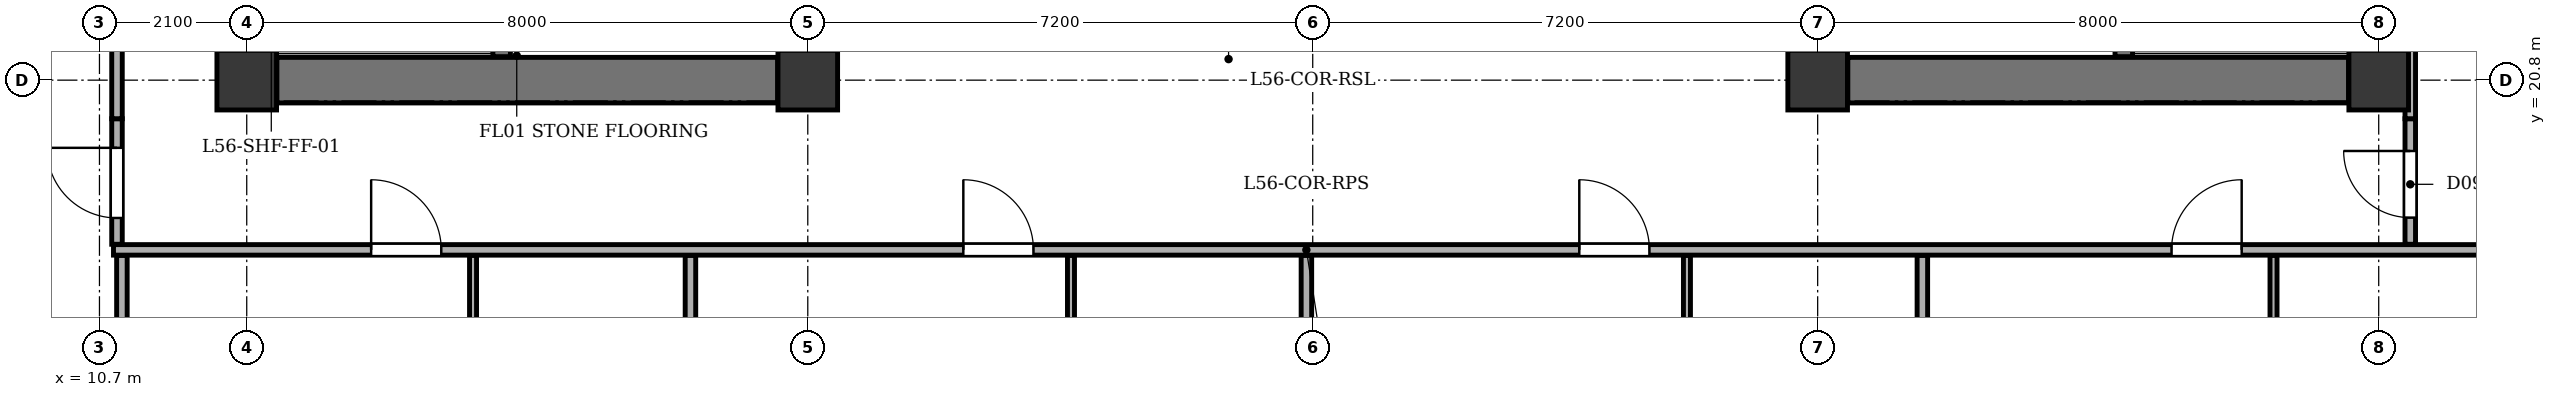
"""IFC4 building model, lengths in metres.
Left out: names, types, materials, properties, quantities, classifications, styles, units other than length and angle.
Written with IfcOpenShell. Run it as: python <this file> out.ifc"""

import sys

from ifc_helpers import new_model, si_unit, direction, frame, frame_2d, origin, origin_2d, place, context, subcontext, project, spatial, rectangle, extrude, element, fill, save


model = new_model("IFC4")
c1 = context("Model", 3, precision=1e-05, world=origin(), true_north=direction((0.0, 1.0)))
c2 = subcontext(c1, "Body", "Model", "MODEL_VIEW")
j1 = project(units=[si_unit("LENGTHUNIT", "METRE"), si_unit("PLANEANGLEUNIT", "RADIAN")], contexts=[c1])
p1 = place(None, origin())
s1 = spatial("IfcSite", under=j1, at=p1, CompositionType="ELEMENT")
p2 = place(p1, origin())
s2 = spatial("IfcBuilding", under=s1, at=p2, CompositionType="ELEMENT")
p3 = place(p2, frame((0.0, 0.0, 217.7)))
s3 = spatial("IfcBuildingStorey", under=s2, at=p3, CompositionType="ELEMENT", Elevation=217.7)
for number, where, z_axis, x_axis in (
    (1, (12.8, 20.8, 0.0), (0.0, 0.0, 1.0), (1.0, 0.0, 0.0)),
    (2, (20.8, 20.8, 0.0), (0.0, 0.0, 1.0), (1.0, 0.0, 0.0)),
    (3, (35.2, 20.8, 0.0), (0.0, 0.0, 1.0), (1.0, 0.0, 0.0)),
    (4, (43.2, 20.8, 0.0), (0.0, 0.0, 1.0), (1.0, 0.0, 0.0)),
):
    element("IfcColumn", number, at=place(p3, frame(where, z_axis=z_axis, x_axis=x_axis)), inside=s3, PredefinedType="COLUMN", context=c2, shape_type="SweptSolid", body=[
        extrude(rectangle(XDim=0.85, YDim=0.85, at=origin_2d()), origin(), (0.0, 0.0, 1.0), 3.4),
    ])
p4 = place(p3, frame((13.23, 20.8, 0.0), z_axis=(0.0, 0.0, 1.0), x_axis=(1.0, 0.0, 0.0)))
e5 = element("IfcWall", 5, at=p4, inside=s3, PredefinedType="SHEAR", context=c2, shape_type="SweptSolid", body=[
    extrude(rectangle(XDim=7.14, YDim=0.65, at=frame_2d((3.57, 0.0))), origin(), (0.0, 0.0, 1.0), 3.1),
])
p5 = place(p3, frame((16.435, 21.135, 0.0), z_axis=(0.0, 0.0, 1.0), x_axis=(0.0, 1.0, 0.0)))
e6 = element("IfcWall", 6, at=p5, inside=s3, PredefinedType="SHEAR", context=c2, shape_type="SweptSolid", body=[
    extrude(rectangle(XDim=12.13, YDim=0.25, at=frame_2d((6.065, 0.0))), origin(), (0.0, 0.0, 1.0), 3.1),
])
p6 = place(p5, frame((0.515, 0.0, 0.0)))
e7 = element("IfcOpeningElement", 7, at=p6, cuts=e6, PredefinedType="OPENING", context=c2, shape_type="SweptSolid", body=[
    extrude(rectangle(XDim=1.2, YDim=2.15, at=frame_2d((0.6, 1.075))), frame((0.0, 0.135, 0.0), z_axis=(0.0, -1.0, 0.0), x_axis=(1.0, 0.0, 0.0)), (0.0, 0.0, 1.0), 0.27),
])
p7 = place(p5, frame((2.665, 0.0, 0.0)))
e8 = element("IfcOpeningElement", 8, at=p7, cuts=e6, PredefinedType="OPENING", context=c2, shape_type="SweptSolid", body=[
    extrude(rectangle(XDim=1.15, YDim=2.15, at=frame_2d((0.575, 1.075))), frame((0.0, 0.135, 0.0), z_axis=(0.0, -1.0, 0.0), x_axis=(1.0, 0.0, 0.0)), (0.0, 0.0, 1.0), 0.27),
])
p8 = place(p3, frame((35.63, 20.8, 0.0), z_axis=(0.0, 0.0, 1.0), x_axis=(1.0, 0.0, 0.0)))
e9 = element("IfcWall", 9, at=p8, inside=s3, PredefinedType="SHEAR", context=c2, shape_type="SweptSolid", body=[
    extrude(rectangle(XDim=7.14, YDim=0.65, at=frame_2d((3.57, 0.0))), origin(), (0.0, 0.0, 1.0), 3.1),
])
p9 = place(p3, frame((39.565, 21.135, 0.0), z_axis=(0.0, 0.0, 1.0), x_axis=(0.0, 1.0, 0.0)))
e10 = element("IfcWall", 10, at=p9, inside=s3, PredefinedType="SHEAR", context=c2, shape_type="SweptSolid", body=[
    extrude(rectangle(XDim=12.13, YDim=0.25, at=frame_2d((6.065, 0.0))), origin(), (0.0, 0.0, 1.0), 3.1),
])
p10 = place(p9, frame((0.515, 0.0, 0.0)))
e11 = element("IfcOpeningElement", 11, at=p10, cuts=e10, PredefinedType="OPENING", context=c2, shape_type="SweptSolid", body=[
    extrude(rectangle(XDim=1.2, YDim=2.15, at=frame_2d((0.6, 1.075))), frame((0.0, 0.135, 0.0), z_axis=(0.0, -1.0, 0.0), x_axis=(1.0, 0.0, 0.0)), (0.0, 0.0, 1.0), 0.27),
])
p11 = place(p9, frame((2.665, 0.0, 0.0)))
e12 = element("IfcOpeningElement", 12, at=p11, cuts=e10, PredefinedType="OPENING", context=c2, shape_type="SweptSolid", body=[
    extrude(rectangle(XDim=1.15, YDim=2.15, at=frame_2d((0.575, 1.075))), frame((0.0, 0.135, 0.0), z_axis=(0.0, -1.0, 0.0), x_axis=(1.0, 0.0, 0.0)), (0.0, 0.0, 1.0), 0.27),
])
p12 = place(p3, frame((10.9, 18.38, 0.0), z_axis=(0.0, 0.0, 1.0), x_axis=(1.0, 0.0, 0.0)))
e13 = element("IfcWall", 13, at=p12, inside=s3, PredefinedType="PARTITIONING", context=c2, shape_type="SweptSolid", body=[
    extrude(rectangle(XDim=34.02, YDim=0.15, at=frame_2d((17.01, 0.0))), origin(), (0.0, 0.0, 1.0), 3.1),
])
p13 = place(p12, frame((3.674, 0.0, 0.0)))
e14 = element("IfcOpeningElement", 14, at=p13, cuts=e13, PredefinedType="OPENING", context=c2, shape_type="SweptSolid", body=[
    extrude(rectangle(XDim=1.0, YDim=2.1, at=frame_2d((0.5, 1.05))), frame((0.0, 0.085, 0.0), z_axis=(0.0, -1.0, 0.0), x_axis=(1.0, 0.0, 0.0)), (0.0, 0.0, 1.0), 0.17),
])
p14 = place(p12, frame((12.118, 0.0, 0.0)))
e15 = element("IfcOpeningElement", 15, at=p14, cuts=e13, PredefinedType="OPENING", context=c2, shape_type="SweptSolid", body=[
    extrude(rectangle(XDim=1.0, YDim=2.1, at=frame_2d((0.5, 1.05))), frame((0.0, 0.085, 0.0), z_axis=(0.0, -1.0, 0.0), x_axis=(1.0, 0.0, 0.0)), (0.0, 0.0, 1.0), 0.17),
])
p15 = place(p12, frame((20.901, 0.0, 0.0)))
e16 = element("IfcOpeningElement", 16, at=p15, cuts=e13, PredefinedType="OPENING", context=c2, shape_type="SweptSolid", body=[
    extrude(rectangle(XDim=1.0, YDim=2.1, at=frame_2d((0.5, 1.05))), frame((0.0, 0.085, 0.0), z_axis=(0.0, -1.0, 0.0), x_axis=(1.0, 0.0, 0.0)), (0.0, 0.0, 1.0), 0.17),
])
p16 = place(p12, frame((29.346, 0.0, 0.0)))
e17 = element("IfcOpeningElement", 17, at=p16, cuts=e13, PredefinedType="OPENING", context=c2, shape_type="SweptSolid", body=[
    extrude(rectangle(XDim=1.0, YDim=2.1, at=frame_2d((0.5, 1.05))), frame((0.0, 0.085, 0.0), z_axis=(0.0, -1.0, 0.0), x_axis=(1.0, 0.0, 0.0)), (0.0, 0.0, 1.0), 0.17),
])
p17 = place(p3, frame((11.02, 3.045, 0.0), z_axis=(0.0, 0.0, 1.0), x_axis=(0.0, 1.0, 0.0)))
e18 = element("IfcWall", 18, at=p17, inside=s3, PredefinedType="PARTITIONING", context=c2, shape_type="SweptSolid", body=[
    extrude(rectangle(XDim=15.255, YDim=0.15, at=frame_2d((7.627, 0.0))), origin(), (0.0, 0.0, 1.0), 3.1),
])
p18 = place(p3, frame((16.027, 5.605, 0.0), z_axis=(0.0, 0.0, 1.0), x_axis=(0.0, 1.0, 0.0)))
e19 = element("IfcWall", 19, at=p18, inside=s3, PredefinedType="PARTITIONING", context=c2, shape_type="SweptSolid", body=[
    extrude(rectangle(XDim=12.695, YDim=0.1, at=frame_2d((6.348, 0.0))), origin(), (0.0, 0.0, 1.0), 3.1),
])
p19 = place(p18, frame((0.605, 0.0, 0.0)))
e20 = element("IfcOpeningElement", 20, at=p19, cuts=e19, PredefinedType="OPENING", context=c2, shape_type="SweptSolid", body=[
    extrude(rectangle(XDim=0.9, YDim=2.05, at=frame_2d((0.45, 1.025))), frame((0.0, 0.06, 0.0), z_axis=(0.0, -1.0, 0.0), x_axis=(1.0, 0.0, 0.0)), (0.0, 0.0, 1.0), 0.12),
])
p20 = place(p3, frame((19.127, 3.045, 0.0), z_axis=(0.0, 0.0, 1.0), x_axis=(0.0, 1.0, 0.0)))
e21 = element("IfcWall", 21, at=p20, inside=s3, PredefinedType="PARTITIONING", context=c2, shape_type="SweptSolid", body=[
    extrude(rectangle(XDim=15.255, YDim=0.15, at=frame_2d((7.627, 0.0))), origin(), (0.0, 0.0, 1.0), 3.1),
])
p21 = place(p3, frame((24.553, 5.605, 0.0), z_axis=(0.0, 0.0, 1.0), x_axis=(0.0, 1.0, 0.0)))
e22 = element("IfcWall", 22, at=p21, inside=s3, PredefinedType="PARTITIONING", context=c2, shape_type="SweptSolid", body=[
    extrude(rectangle(XDim=12.695, YDim=0.1, at=frame_2d((6.348, 0.0))), origin(), (0.0, 0.0, 1.0), 3.1),
])
p22 = place(p21, frame((0.605, 0.0, 0.0)))
e23 = element("IfcOpeningElement", 23, at=p22, cuts=e22, PredefinedType="OPENING", context=c2, shape_type="SweptSolid", body=[
    extrude(rectangle(XDim=0.9, YDim=2.05, at=frame_2d((0.45, 1.025))), frame((0.0, 0.06, 0.0), z_axis=(0.0, -1.0, 0.0), x_axis=(1.0, 0.0, 0.0)), (0.0, 0.0, 1.0), 0.12),
])
p23 = place(p3, frame((27.91, 3.045, 0.0), z_axis=(0.0, 0.0, 1.0), x_axis=(0.0, 1.0, 0.0)))
e24 = element("IfcWall", 24, at=p23, inside=s3, PredefinedType="PARTITIONING", context=c2, shape_type="SweptSolid", body=[
    extrude(rectangle(XDim=15.255, YDim=0.15, at=frame_2d((7.627, 0.0))), origin(), (0.0, 0.0, 1.0), 2.535),
])
p24 = place(p3, frame((33.336, 5.605, 0.0), z_axis=(0.0, 0.0, 1.0), x_axis=(0.0, 1.0, 0.0)))
e25 = element("IfcWall", 25, at=p24, inside=s3, PredefinedType="PARTITIONING", context=c2, shape_type="SweptSolid", body=[
    extrude(rectangle(XDim=12.695, YDim=0.1, at=frame_2d((6.348, 0.0))), origin(), (0.0, 0.0, 1.0), 3.1),
])
p25 = place(p24, frame((0.605, 0.0, 0.0)))
e26 = element("IfcOpeningElement", 26, at=p25, cuts=e25, PredefinedType="OPENING", context=c2, shape_type="SweptSolid", body=[
    extrude(rectangle(XDim=0.9, YDim=2.05, at=frame_2d((0.45, 1.025))), frame((0.0, 0.06, 0.0), z_axis=(0.0, -1.0, 0.0), x_axis=(1.0, 0.0, 0.0)), (0.0, 0.0, 1.0), 0.12),
])
p26 = place(p3, frame((36.693, 3.045, 0.0), z_axis=(0.0, 0.0, 1.0), x_axis=(0.0, 1.0, 0.0)))
e27 = element("IfcWall", 27, at=p26, inside=s3, PredefinedType="PARTITIONING", context=c2, shape_type="SweptSolid", body=[
    extrude(rectangle(XDim=15.255, YDim=0.15, at=frame_2d((7.627, 0.0))), origin(), (0.0, 0.0, 1.0), 2.725),
])
p27 = place(p3, frame((41.7, 5.605, 0.0), z_axis=(0.0, 0.0, 1.0), x_axis=(0.0, 1.0, 0.0)))
e28 = element("IfcWall", 28, at=p27, inside=s3, PredefinedType="PARTITIONING", context=c2, shape_type="SweptSolid", body=[
    extrude(rectangle(XDim=12.695, YDim=0.1, at=frame_2d((6.348, 0.0))), origin(), (0.0, 0.0, 1.0), 3.1),
])
p28 = place(p27, frame((0.605, 0.0, 0.0)))
e29 = element("IfcOpeningElement", 29, at=p28, cuts=e28, PredefinedType="OPENING", context=c2, shape_type="SweptSolid", body=[
    extrude(rectangle(XDim=0.9, YDim=2.05, at=frame_2d((0.45, 1.025))), frame((0.0, 0.06, 0.0), z_axis=(0.0, -1.0, 0.0), x_axis=(1.0, 0.0, 0.0)), (0.0, 0.0, 1.0), 0.12),
])
p29 = place(p3, frame((10.95, 18.46, 0.0), z_axis=(0.0, 0.0, 1.0), x_axis=(0.0, 1.0, 0.0)))
e30 = element("IfcWall", 30, at=p29, inside=s3, PredefinedType="PARTITIONING", context=c2, shape_type="SweptSolid", body=[
    extrude(rectangle(XDim=1.79, YDim=0.15, at=frame_2d((0.895, 0.0))), origin(), (0.0, 0.0, 1.0), 3.1),
])
p30 = place(p29, frame((0.375, 0.0, 0.0)))
e31 = element("IfcOpeningElement", 31, at=p30, cuts=e30, PredefinedType="OPENING", context=c2, shape_type="SweptSolid", body=[
    extrude(rectangle(XDim=1.0, YDim=2.1, at=frame_2d((0.5, 1.05))), frame((0.0, 0.085, 0.0), z_axis=(0.0, -1.0, 0.0), x_axis=(1.0, 0.0, 0.0)), (0.0, 0.0, 1.0), 0.17),
])
p31 = place(p3, frame((10.95, 20.25, 0.0), z_axis=(0.0, 0.0, 1.0), x_axis=(0.0, 1.0, 0.0)))
e32 = element("IfcWall", 32, at=p31, inside=s3, PredefinedType="PARTITIONING", context=c2, shape_type="SweptSolid", body=[
    extrude(rectangle(XDim=13.9, YDim=0.15, at=frame_2d((6.95, 0.0))), origin(), (0.0, 0.0, 1.0), 3.1),
])
p32 = place(p3, frame((43.65, 18.46, 0.0), z_axis=(0.0, 0.0, 1.0), x_axis=(0.0, 1.0, 0.0)))
e33 = element("IfcWall", 33, at=p32, inside=s3, PredefinedType="PARTITIONING", context=c2, shape_type="SweptSolid", body=[
    extrude(rectangle(XDim=1.79, YDim=0.15, at=frame_2d((0.895, 0.0))), origin(), (0.0, 0.0, 1.0), 3.1),
])
p33 = place(p32, frame((0.38, 0.0, 0.0)))
e34 = element("IfcOpeningElement", 34, at=p33, cuts=e33, PredefinedType="OPENING", context=c2, shape_type="SweptSolid", body=[
    extrude(rectangle(XDim=0.95, YDim=2.1, at=frame_2d((0.475, 1.05))), frame((0.0, 0.085, 0.0), z_axis=(0.0, -1.0, 0.0), x_axis=(1.0, 0.0, 0.0)), (0.0, 0.0, 1.0), 0.17),
])
p34 = place(p3, frame((43.65, 20.25, 0.0), z_axis=(0.0, 0.0, 1.0), x_axis=(0.0, 1.0, 0.0)))
e35 = element("IfcWall", 35, at=p34, inside=s3, PredefinedType="PARTITIONING", context=c2, shape_type="SweptSolid", body=[
    extrude(rectangle(XDim=13.27, YDim=0.15, at=frame_2d((6.635, 0.0))), origin(), (0.0, 0.0, 1.0), 3.1),
])
p35 = place(p13, origin())
e36 = element("IfcDoor", 36, at=p35, inside=s3, OperationType="SINGLE_SWING_LEFT", PredefinedType="DOOR", context=c2, shape_type="SweptSolid", body=[
    extrude(rectangle(XDim=1.0, YDim=2.1, at=frame_2d((0.5, 1.05))), frame((0.0, 0.025, 0.0), z_axis=(0.0, -1.0, 0.0), x_axis=(1.0, 0.0, 0.0)), (0.0, 0.0, 1.0), 0.05),
])
fill(e14, e36)
p36 = place(p14, origin())
e37 = element("IfcDoor", 37, at=p36, inside=s3, OperationType="SINGLE_SWING_LEFT", PredefinedType="DOOR", context=c2, shape_type="SweptSolid", body=[
    extrude(rectangle(XDim=1.0, YDim=2.1, at=frame_2d((0.5, 1.05))), frame((0.0, 0.025, 0.0), z_axis=(0.0, -1.0, 0.0), x_axis=(1.0, 0.0, 0.0)), (0.0, 0.0, 1.0), 0.05),
])
fill(e15, e37)
p37 = place(p15, origin())
e38 = element("IfcDoor", 38, at=p37, inside=s3, OperationType="SINGLE_SWING_LEFT", PredefinedType="DOOR", context=c2, shape_type="SweptSolid", body=[
    extrude(rectangle(XDim=1.0, YDim=2.1, at=frame_2d((0.5, 1.05))), frame((0.0, 0.025, 0.0), z_axis=(0.0, -1.0, 0.0), x_axis=(1.0, 0.0, 0.0)), (0.0, 0.0, 1.0), 0.05),
])
fill(e16, e38)
p38 = place(p16, origin())
e39 = element("IfcDoor", 39, at=p38, inside=s3, OperationType="SINGLE_SWING_RIGHT", PredefinedType="DOOR", context=c2, shape_type="SweptSolid", body=[
    extrude(rectangle(XDim=1.0, YDim=2.1, at=frame_2d((0.5, 1.05))), frame((0.0, 0.025, 0.0), z_axis=(0.0, -1.0, 0.0), x_axis=(1.0, 0.0, 0.0)), (0.0, 0.0, 1.0), 0.05),
])
fill(e17, e39)
p39 = place(p30, origin())
e40 = element("IfcDoor", 40, at=p39, inside=s3, OperationType="SINGLE_SWING_RIGHT", PredefinedType="DOOR", context=c2, shape_type="SweptSolid", body=[
    extrude(rectangle(XDim=1.0, YDim=2.1, at=frame_2d((0.5, 1.05))), frame((0.0, 0.025, 0.0), z_axis=(0.0, -1.0, 0.0), x_axis=(1.0, 0.0, 0.0)), (0.0, 0.0, 1.0), 0.05),
])
fill(e31, e40)
p40 = place(p33, origin())
e41 = element("IfcDoor", 41, at=p40, inside=s3, OperationType="SINGLE_SWING_RIGHT", PredefinedType="DOOR", context=c2, shape_type="SweptSolid", body=[
    extrude(rectangle(XDim=0.95, YDim=2.1, at=frame_2d((0.475, 1.05))), frame((0.0, 0.025, 0.0), z_axis=(0.0, -1.0, 0.0), x_axis=(1.0, 0.0, 0.0)), (0.0, 0.0, 1.0), 0.05),
])
fill(e34, e41)
save(model, sys.argv[1])
